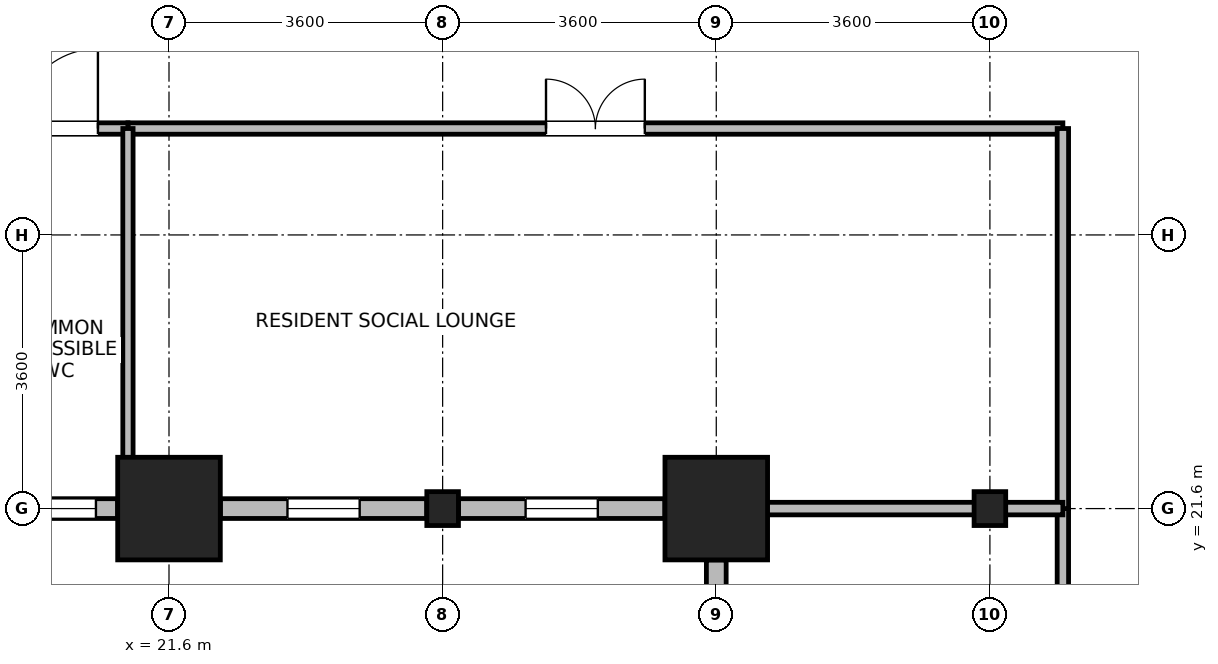
"""IFC4 building model, lengths in metres.
Left out: names, types, materials, properties, quantities, classifications, styles, units other than length and angle.
Written with IfcOpenShell. Run it as: python <this file> out.ifc"""

import sys

from ifc_helpers import new_model, si_unit, direction, frame, frame_2d, origin, origin_2d, place, context, subcontext, project, spatial, rectangle, i_section, extrude, source, transform, mapped, element, fill, save


model = new_model("IFC4")
c1 = context("Model", 3, precision=1e-05, world=origin(), true_north=direction((0.0, 1.0)))
c2 = subcontext(c1, "Body", "Model", "MODEL_VIEW")
j1 = project(units=[si_unit("LENGTHUNIT", "METRE"), si_unit("PLANEANGLEUNIT", "RADIAN")], contexts=[c1])
p1 = place(None, origin())
s1 = spatial("IfcSite", under=j1, at=p1, CompositionType="ELEMENT")
p2 = place(p1, origin())
s2 = spatial("IfcBuilding", under=s1, at=p2, CompositionType="ELEMENT")
p3 = place(p2, frame((0.0, 0.0, 47.5)))
s3 = spatial("IfcBuildingStorey", under=s2, at=p3, CompositionType="ELEMENT", Elevation=47.5)
m1 = source(origin(), c2, "Body", "SweptSolid", [
    extrude(rectangle(XDim=1.35, YDim=1.35, at=origin_2d()), origin(), (0.0, 0.0, 1.0), 3.7),
])
for number, where, z_axis, x_axis in (
    (1, (21.6, 21.6, 0.0), (0.0, 0.0, 1.0), (1.0, 0.0, 0.0)),
    (2, (28.8, 21.6, 0.0), (0.0, 0.0, 1.0), (1.0, 0.0, 0.0)),
):
    element("IfcColumn", number, at=place(p3, frame(where, z_axis=z_axis, x_axis=x_axis)), inside=s3, PredefinedType="COLUMN", context=c2, shape_type="MappedRepresentation", body=[
        mapped(m1, transform((0.0, 0.0, 0.0), x_axis=(1.0, 0.0, 0.0), y_axis=(0.0, 1.0, 0.0), z_axis=(0.0, 0.0, 1.0), scale=1.0)),
    ])
m2 = source(origin(), c2, "Body", "SweptSolid", [
    extrude(i_section(OverallWidth=0.416, OverallDepth=0.446, WebThickness=0.029, FlangeThickness=0.04, FilletRadius=0.015, at=origin_2d()), origin(), (0.0, 0.0, 1.0), 3.7),
])
for number, where, z_axis, x_axis in (
    (3, (25.2, 21.6, 0.0), (0.0, 0.0, 1.0), (1.0, 0.0, 0.0)),
    (4, (32.4, 21.6, 0.0), (0.0, 0.0, 1.0), (1.0, 0.0, 0.0)),
):
    element("IfcColumn", number, at=place(p3, frame(where, z_axis=z_axis, x_axis=x_axis)), inside=s3, PredefinedType="COLUMN", context=c2, shape_type="MappedRepresentation", body=[
        mapped(m2, transform((0.0, 0.0, 0.0), x_axis=(1.0, 0.0, 0.0), y_axis=(0.0, 1.0, 0.0), z_axis=(0.0, 0.0, 1.0), scale=1.0)),
    ])
p4 = place(p3, frame((20.924, 21.6, 0.0), z_axis=(0.0, 0.0, 1.0), x_axis=(-1.0, 0.0, 0.0)))
e5 = element("IfcWall", 5, at=p4, inside=s3, PredefinedType="STANDARD", context=c2, shape_type="SweptSolid", body=[
    extrude(rectangle(XDim=2.715, YDim=0.26, at=frame_2d((1.357, 0.0))), origin(), (0.0, 0.0, 1.0), 2.93),
])
p5 = place(p4, frame((0.285, 0.0, 0.85)))
e6 = element("IfcOpeningElement", 6, at=p5, cuts=e5, PredefinedType="OPENING", context=c2, shape_type="SweptSolid", body=[
    extrude(rectangle(XDim=0.95, YDim=1.75, at=frame_2d((0.475, 0.875))), frame((0.0, 0.14, 0.0), z_axis=(0.0, -1.0, 0.0), x_axis=(1.0, 0.0, 0.0)), (0.0, 0.0, 1.0), 0.28),
])
p6 = place(p3, frame((24.991, 21.6, 0.0), z_axis=(0.0, 0.0, 1.0), x_axis=(-1.0, 0.0, 0.0)))
e7 = element("IfcWall", 7, at=p6, inside=s3, PredefinedType="STANDARD", context=c2, shape_type="SweptSolid", body=[
    extrude(rectangle(XDim=2.715, YDim=0.26, at=frame_2d((1.357, 0.0))), origin(), (0.0, 0.0, 1.0), 2.93),
])
p7 = place(p6, frame((0.883, 0.0, 0.85)))
e8 = element("IfcOpeningElement", 8, at=p7, cuts=e7, PredefinedType="OPENING", context=c2, shape_type="SweptSolid", body=[
    extrude(rectangle(XDim=0.95, YDim=1.75, at=frame_2d((0.475, 0.875))), frame((0.0, 0.14, 0.0), z_axis=(0.0, -1.0, 0.0), x_axis=(1.0, 0.0, 0.0)), (0.0, 0.0, 1.0), 0.28),
])
p8 = place(p3, frame((28.124, 21.6, 0.0), z_axis=(0.0, 0.0, 1.0), x_axis=(-1.0, 0.0, 0.0)))
e9 = element("IfcWall", 9, at=p8, inside=s3, PredefinedType="STANDARD", context=c2, shape_type="SweptSolid", body=[
    extrude(rectangle(XDim=2.715, YDim=0.26, at=frame_2d((1.357, 0.0))), origin(), (0.0, 0.0, 1.0), 2.93),
])
p9 = place(p8, frame((0.883, 0.0, 0.85)))
e10 = element("IfcOpeningElement", 10, at=p9, cuts=e9, PredefinedType="OPENING", context=c2, shape_type="SweptSolid", body=[
    extrude(rectangle(XDim=0.95, YDim=1.75, at=frame_2d((0.475, 0.875))), frame((0.0, 0.14, 0.0), z_axis=(0.0, -1.0, 0.0), x_axis=(1.0, 0.0, 0.0)), (0.0, 0.0, 1.0), 0.28),
])
p10 = place(p3, frame((28.8, 1.67, 0.0), z_axis=(0.0, 0.0, 1.0), x_axis=(0.0, 1.0, 0.0)))
e11 = element("IfcWall", 11, at=p10, inside=s3, PredefinedType="STANDARD", context=c2, shape_type="SweptSolid", body=[
    extrude(rectangle(XDim=19.254, YDim=0.26, at=frame_2d((9.627, 0.0))), origin(), (0.0, 0.0, 1.0), 3.43),
])
p11 = place(p10, frame((0.705, 0.0, 0.85)))
e12 = element("IfcOpeningElement", 12, at=p11, cuts=e11, PredefinedType="OPENING", context=c2, shape_type="SweptSolid", body=[
    extrude(rectangle(XDim=1.8, YDim=1.85, at=frame_2d((0.9, 0.925))), frame((0.0, 0.14, 0.0), z_axis=(0.0, -1.0, 0.0), x_axis=(1.0, 0.0, 0.0)), (0.0, 0.0, 1.0), 0.28),
])
p12 = place(p10, frame((7.123, 0.0, 0.85)))
e13 = element("IfcOpeningElement", 13, at=p12, cuts=e11, PredefinedType="OPENING", context=c2, shape_type="SweptSolid", body=[
    extrude(rectangle(XDim=1.8, YDim=1.85, at=frame_2d((0.9, 0.925))), frame((0.0, 0.14, 0.0), z_axis=(0.0, -1.0, 0.0), x_axis=(1.0, 0.0, 0.0)), (0.0, 0.0, 1.0), 0.28),
])
p13 = place(p10, frame((10.332, 0.0, 0.85)))
e14 = element("IfcOpeningElement", 14, at=p13, cuts=e11, PredefinedType="OPENING", context=c2, shape_type="SweptSolid", body=[
    extrude(rectangle(XDim=1.8, YDim=1.85, at=frame_2d((0.9, 0.925))), frame((0.0, 0.14, 0.0), z_axis=(0.0, -1.0, 0.0), x_axis=(1.0, 0.0, 0.0)), (0.0, 0.0, 1.0), 0.28),
])
p14 = place(p10, frame((13.541, 0.0, 0.85)))
e15 = element("IfcOpeningElement", 15, at=p14, cuts=e11, PredefinedType="OPENING", context=c2, shape_type="SweptSolid", body=[
    extrude(rectangle(XDim=1.8, YDim=1.85, at=frame_2d((0.9, 0.925))), frame((0.0, 0.14, 0.0), z_axis=(0.0, -1.0, 0.0), x_axis=(1.0, 0.0, 0.0)), (0.0, 0.0, 1.0), 0.28),
])
p15 = place(p10, frame((16.75, 0.0, 0.85)))
e16 = element("IfcOpeningElement", 16, at=p15, cuts=e11, PredefinedType="OPENING", context=c2, shape_type="SweptSolid", body=[
    extrude(rectangle(XDim=1.8, YDim=1.85, at=frame_2d((0.9, 0.925))), frame((0.0, 0.14, 0.0), z_axis=(0.0, -1.0, 0.0), x_axis=(1.0, 0.0, 0.0)), (0.0, 0.0, 1.0), 0.28),
])
p16 = place(p3, frame((21.06, 26.6, 0.0), z_axis=(0.0, 0.0, 1.0), x_axis=(1.0, 0.0, 0.0)))
e17 = element("IfcWall", 17, at=p16, inside=s3, PredefinedType="PARTITIONING", context=c2, shape_type="SweptSolid", body=[
    extrude(rectangle(XDim=12.3, YDim=0.15, at=frame_2d((6.15, 0.0))), origin(), (0.0, 0.0, 1.0), 3.43),
])
p17 = place(p16, frame((5.5, 0.0, 0.0)))
e18 = element("IfcOpeningElement", 18, at=p17, cuts=e17, PredefinedType="OPENING", context=c2, shape_type="SweptSolid", body=[
    extrude(rectangle(XDim=1.3, YDim=2.12, at=frame_2d((0.65, 1.06))), frame((0.0, 0.085, 0.0), z_axis=(0.0, -1.0, 0.0), x_axis=(1.0, 0.0, 0.0)), (0.0, 0.0, 1.0), 0.17),
])
p18 = place(p3, frame((33.36, 14.5, 0.0), z_axis=(0.0, 0.0, 1.0), x_axis=(0.0, 1.0, 0.0)))
e19 = element("IfcWall", 19, at=p18, inside=s3, PredefinedType="PARTITIONING", context=c2, shape_type="SweptSolid", body=[
    extrude(rectangle(XDim=7.1, YDim=0.15, at=frame_2d((3.55, 0.0))), origin(), (0.0, 0.0, 1.0), 3.43),
])
p19 = place(p18, frame((2.9, 0.0, 0.0)))
e20 = element("IfcOpeningElement", 20, at=p19, cuts=e19, PredefinedType="OPENING", context=c2, shape_type="SweptSolid", body=[
    extrude(rectangle(XDim=1.3, YDim=2.12, at=frame_2d((0.65, 1.06))), frame((0.0, 0.085, 0.0), z_axis=(0.0, -1.0, 0.0), x_axis=(1.0, 0.0, 0.0)), (0.0, 0.0, 1.0), 0.17),
])
p20 = place(p3, frame((33.36, 21.6, 0.0), z_axis=(0.0, 0.0, 1.0), x_axis=(0.0, 1.0, 0.0)))
e21 = element("IfcWall", 21, at=p20, inside=s3, PredefinedType="PARTITIONING", context=c2, shape_type="SweptSolid", body=[
    extrude(rectangle(XDim=5.0, YDim=0.15, at=frame_2d((2.5, 0.0))), origin(), (0.0, 0.0, 1.0), 3.43),
])
p21 = place(p3, frame((19.22, 26.6, 0.0), z_axis=(0.0, 0.0, 1.0), x_axis=(1.0, 0.0, 0.0)))
e22 = element("IfcWall", 22, at=p21, inside=s3, PredefinedType="PARTITIONING", context=c2, shape_type="SweptSolid", body=[
    extrude(rectangle(XDim=1.84, YDim=0.15, at=frame_2d((0.92, 0.0))), origin(), (0.0, 0.0, 1.0), 3.43),
])
p22 = place(p21, frame((0.395, 0.0, 0.0)))
e23 = element("IfcOpeningElement", 23, at=p22, cuts=e22, PredefinedType="OPENING", context=c2, shape_type="SweptSolid", body=[
    extrude(rectangle(XDim=1.05, YDim=2.12, at=frame_2d((0.525, 1.06))), frame((0.0, 0.085, 0.0), z_axis=(0.0, -1.0, 0.0), x_axis=(1.0, 0.0, 0.0)), (0.0, 0.0, 1.0), 0.17),
])
p23 = place(p3, frame((21.06, 21.732, 0.0), z_axis=(0.0, 0.0, 1.0), x_axis=(0.0, 1.0, 0.0)))
e24 = element("IfcWall", 24, at=p23, inside=s3, PredefinedType="PARTITIONING", context=c2, shape_type="SweptSolid", body=[
    extrude(rectangle(XDim=4.868, YDim=0.135, at=frame_2d((2.434, 0.0))), origin(), (0.0, 0.0, 1.0), 3.43),
])
p24 = place(p3, frame((28.932, 21.6, 0.0), z_axis=(0.0, 0.0, 1.0), x_axis=(1.0, 0.0, 0.0)))
e25 = element("IfcWall", 25, at=p24, inside=s3, PredefinedType="PARTITIONING", context=c2, shape_type="SweptSolid", body=[
    extrude(rectangle(XDim=4.428, YDim=0.165, at=frame_2d((2.214, 0.0))), origin(), (0.0, 0.0, 1.0), 2.93),
])
p25 = place(p5, origin())
e26 = element("IfcWindow", 26, at=p25, inside=s3, PartitioningType="SINGLE_PANEL", PredefinedType="WINDOW", context=c2, shape_type="SweptSolid", body=[
    extrude(rectangle(XDim=0.95, YDim=1.75, at=frame_2d((0.475, 0.875))), frame((0.0, 0.03, 0.0), z_axis=(0.0, -1.0, 0.0), x_axis=(1.0, 0.0, 0.0)), (0.0, 0.0, 1.0), 0.06),
])
fill(e6, e26)
p26 = place(p7, origin())
e27 = element("IfcWindow", 27, at=p26, inside=s3, PartitioningType="SINGLE_PANEL", PredefinedType="WINDOW", context=c2, shape_type="SweptSolid", body=[
    extrude(rectangle(XDim=0.95, YDim=1.75, at=frame_2d((0.475, 0.875))), frame((0.0, 0.03, 0.0), z_axis=(0.0, -1.0, 0.0), x_axis=(1.0, 0.0, 0.0)), (0.0, 0.0, 1.0), 0.06),
])
fill(e8, e27)
p27 = place(p9, origin())
e28 = element("IfcWindow", 28, at=p27, inside=s3, PartitioningType="SINGLE_PANEL", PredefinedType="WINDOW", context=c2, shape_type="SweptSolid", body=[
    extrude(rectangle(XDim=0.95, YDim=1.75, at=frame_2d((0.475, 0.875))), frame((0.0, 0.03, 0.0), z_axis=(0.0, -1.0, 0.0), x_axis=(1.0, 0.0, 0.0)), (0.0, 0.0, 1.0), 0.06),
])
fill(e10, e28)
p28 = place(p17, origin())
e29 = element("IfcDoor", 29, at=p28, inside=s3, OperationType="DOUBLE_DOOR_SINGLE_SWING", PredefinedType="DOOR", context=c2, shape_type="SweptSolid", body=[
    extrude(rectangle(XDim=1.3, YDim=2.12, at=frame_2d((0.65, 1.06))), frame((0.0, 0.025, 0.0), z_axis=(0.0, -1.0, 0.0), x_axis=(1.0, 0.0, 0.0)), (0.0, 0.0, 1.0), 0.05),
])
fill(e18, e29)
p29 = place(p22, origin())
e30 = element("IfcDoor", 30, at=p29, inside=s3, OperationType="SINGLE_SWING_RIGHT", PredefinedType="DOOR", context=c2, shape_type="SweptSolid", body=[
    extrude(rectangle(XDim=1.05, YDim=2.12, at=frame_2d((0.525, 1.06))), frame((0.0, 0.025, 0.0), z_axis=(0.0, -1.0, 0.0), x_axis=(1.0, 0.0, 0.0)), (0.0, 0.0, 1.0), 0.05),
])
fill(e23, e30)
save(model, sys.argv[1])
